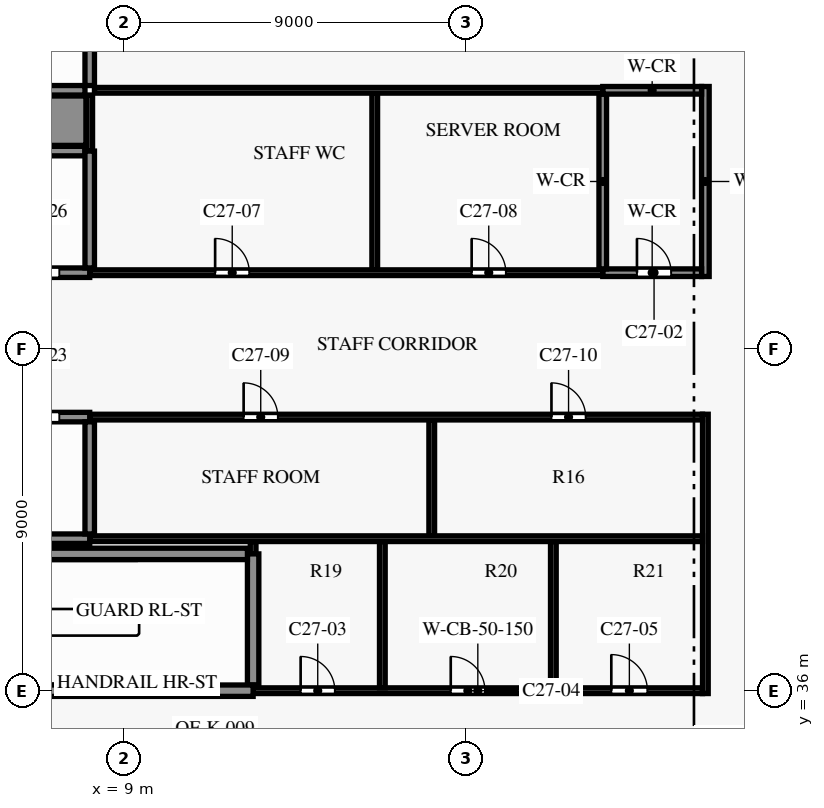
"""IFC4 building model, lengths in metres.
Left out: names, types, materials, properties, quantities, classifications, styles, units other than length and angle.
Written with IfcOpenShell. Run it as: python <this file> out.ifc"""

import sys

from ifc_helpers import new_model, si_unit, direction, frame, frame_2d, origin, place, context, subcontext, project, spatial, rectangle, extrude, element, fill, save


model = new_model("IFC4")
c1 = context("Model", 3, precision=1e-05, world=origin(), true_north=direction((0.0, 1.0)))
c2 = subcontext(c1, "Body", "Model", "MODEL_VIEW")
j1 = project(units=[si_unit("LENGTHUNIT", "METRE"), si_unit("PLANEANGLEUNIT", "RADIAN")], contexts=[c1])
p1 = place(None, origin())
s1 = spatial("IfcSite", under=j1, at=p1, CompositionType="ELEMENT")
p2 = place(p1, origin())
s2 = spatial("IfcBuilding", under=s1, at=p2, CompositionType="ELEMENT")
p3 = place(p2, frame((0.0, 0.0, 198.8)))
s3 = spatial("IfcBuildingStorey", under=s2, at=p3, CompositionType="ELEMENT", Elevation=198.8)
p4 = place(p3, frame((12.4, 36.0, 0.0), z_axis=(0.0, 0.0, 1.0), x_axis=(1.0, 0.0, 0.0)))
e1 = element("IfcWall", 1, at=p4, inside=s3, PredefinedType="SHEAR", context=c2, shape_type="SweptSolid", body=[
    extrude(rectangle(XDim=11.825, YDim=0.15, at=frame_2d((5.913, 0.0))), origin(), (0.0, 0.0, 1.0), 3.5),
])
p5 = place(p4, frame((1.25, 0.0, 0.0)))
e2 = element("IfcOpeningElement", 2, at=p5, cuts=e1, PredefinedType="OPENING", context=c2, shape_type="SweptSolid", body=[
    extrude(rectangle(XDim=0.9, YDim=2.1, at=frame_2d((0.45, 1.05))), frame((0.0, 0.085, 0.0), z_axis=(0.0, -1.0, 0.0), x_axis=(1.0, 0.0, 0.0)), (0.0, 0.0, 1.0), 0.17),
])
p6 = place(p4, frame((5.2, 0.0, 0.0)))
e3 = element("IfcOpeningElement", 3, at=p6, cuts=e1, PredefinedType="OPENING", context=c2, shape_type="SweptSolid", body=[
    extrude(rectangle(XDim=0.9, YDim=2.1, at=frame_2d((0.45, 1.05))), frame((0.0, 0.085, 0.0), z_axis=(0.0, -1.0, 0.0), x_axis=(1.0, 0.0, 0.0)), (0.0, 0.0, 1.0), 0.17),
])
p7 = place(p4, frame((9.425, 0.0, 0.0)))
e4 = element("IfcOpeningElement", 4, at=p7, cuts=e1, PredefinedType="OPENING", context=c2, shape_type="SweptSolid", body=[
    extrude(rectangle(XDim=0.95, YDim=2.1, at=frame_2d((0.475, 1.05))), frame((0.0, 0.085, 0.0), z_axis=(0.0, -1.0, 0.0), x_axis=(1.0, 0.0, 0.0)), (0.0, 0.0, 1.0), 0.17),
])
p8 = place(p3, frame((4.4, 36.0, 0.0), z_axis=(0.0, 0.0, 1.0), x_axis=(1.0, 0.0, 0.0)))
e5 = element("IfcWall", 5, at=p8, inside=s3, PredefinedType="SHEAR", context=c2, shape_type="SweptSolid", body=[
    extrude(rectangle(XDim=8.0, YDim=0.3, at=frame_2d((4.0, 0.0))), origin(), (0.0, 0.0, 1.0), 3.5),
])
p9 = place(p8, frame((0.3, 0.0, 0.0)))
e6 = element("IfcOpeningElement", 6, at=p9, cuts=e5, PredefinedType="OPENING", context=c2, shape_type="SweptSolid", body=[
    extrude(rectangle(XDim=1.5, YDim=2.2, at=frame_2d((0.75, 1.1))), frame((0.0, 0.16, 0.0), z_axis=(0.0, -1.0, 0.0), x_axis=(1.0, 0.0, 0.0)), (0.0, 0.0, 1.0), 0.32),
])
p10 = place(p3, frame((4.55, 39.6, 0.0), z_axis=(0.0, 0.0, 1.0), x_axis=(1.0, 0.0, 0.0)))
e7 = element("IfcWall", 7, at=p10, inside=s3, PredefinedType="SHEAR", context=c2, shape_type="SweptSolid", body=[
    extrude(rectangle(XDim=7.7, YDim=0.3, at=frame_2d((3.85, 0.0))), origin(), (0.0, 0.0, 1.0), 3.5),
])
p11 = place(p3, frame((8.1, 40.0, 0.0), z_axis=(0.0, 0.0, 1.0), x_axis=(1.0, 0.0, 0.0)))
e8 = element("IfcWall", 8, at=p11, inside=s3, PredefinedType="PARTITIONING", context=c2, shape_type="SweptSolid", body=[
    extrude(rectangle(XDim=16.125, YDim=0.15, at=frame_2d((8.062, 0.0))), origin(), (0.0, 0.0, 1.0), 3.5),
])
p12 = place(p3, frame((0.15, 40.0, 0.0), z_axis=(0.0, 0.0, 1.0), x_axis=(1.0, 0.0, 0.0)))
e9 = element("IfcWall", 9, at=p12, inside=s3, PredefinedType="SHEAR", context=c2, shape_type="SweptSolid", body=[
    extrude(rectangle(XDim=7.95, YDim=0.25, at=frame_2d((3.975, 0.0))), origin(), (0.0, 0.0, 1.0), 3.5),
])
p13 = place(p3, frame((8.1, 43.2, 0.0), z_axis=(0.0, 0.0, 1.0), x_axis=(1.0, 0.0, 0.0)))
e10 = element("IfcWall", 10, at=p13, inside=s3, PredefinedType="PARTITIONING", context=c2, shape_type="SweptSolid", body=[
    extrude(rectangle(XDim=16.125, YDim=0.15, at=frame_2d((8.062, 0.0))), origin(), (0.0, 0.0, 1.0), 3.5),
])
p14 = place(p13, frame((4.05, 0.0, 0.0)))
e11 = element("IfcOpeningElement", 11, at=p14, cuts=e10, PredefinedType="OPENING", context=c2, shape_type="SweptSolid", body=[
    extrude(rectangle(XDim=0.9, YDim=2.1, at=frame_2d((0.45, 1.05))), frame((0.0, 0.085, 0.0), z_axis=(0.0, -1.0, 0.0), x_axis=(1.0, 0.0, 0.0)), (0.0, 0.0, 1.0), 0.17),
])
p15 = place(p13, frame((12.15, 0.0, 0.0)))
e12 = element("IfcOpeningElement", 12, at=p15, cuts=e10, PredefinedType="OPENING", context=c2, shape_type="SweptSolid", body=[
    extrude(rectangle(XDim=0.9, YDim=2.1, at=frame_2d((0.45, 1.05))), frame((0.0, 0.085, 0.0), z_axis=(0.0, -1.0, 0.0), x_axis=(1.0, 0.0, 0.0)), (0.0, 0.0, 1.0), 0.17),
])
p16 = place(p3, frame((0.125, 43.2, 0.0), z_axis=(0.0, 0.0, 1.0), x_axis=(1.0, 0.0, 0.0)))
e13 = element("IfcWall", 13, at=p16, inside=s3, PredefinedType="SHEAR", context=c2, shape_type="SweptSolid", body=[
    extrude(rectangle(XDim=7.975, YDim=0.25, at=frame_2d((3.988, 0.0))), origin(), (0.0, 0.0, 1.0), 3.5),
])
p17 = place(p16, frame((0.675, 0.0, 0.0)))
e14 = element("IfcOpeningElement", 14, at=p17, cuts=e13, PredefinedType="OPENING", context=c2, shape_type="SweptSolid", body=[
    extrude(rectangle(XDim=1.1, YDim=2.1, at=frame_2d((0.55, 1.05))), frame((0.0, 0.135, 0.0), z_axis=(0.0, -1.0, 0.0), x_axis=(1.0, 0.0, 0.0)), (0.0, 0.0, 1.0), 0.27),
])
p18 = place(p16, frame((3.375, 0.0, 0.0)))
e15 = element("IfcOpeningElement", 15, at=p18, cuts=e13, PredefinedType="OPENING", context=c2, shape_type="SweptSolid", body=[
    extrude(rectangle(XDim=1.1, YDim=2.1, at=frame_2d((0.55, 1.05))), frame((0.0, 0.135, 0.0), z_axis=(0.0, -1.0, 0.0), x_axis=(1.0, 0.0, 0.0)), (0.0, 0.0, 1.0), 0.27),
])
p19 = place(p16, frame((6.075, 0.0, 0.0)))
e16 = element("IfcOpeningElement", 16, at=p19, cuts=e13, PredefinedType="OPENING", context=c2, shape_type="SweptSolid", body=[
    extrude(rectangle(XDim=1.1, YDim=2.1, at=frame_2d((0.55, 1.05))), frame((0.0, 0.135, 0.0), z_axis=(0.0, -1.0, 0.0), x_axis=(1.0, 0.0, 0.0)), (0.0, 0.0, 1.0), 0.27),
])
p20 = place(p3, frame((8.1, 47.0, 0.0), z_axis=(0.0, 0.0, 1.0), x_axis=(1.0, 0.0, 0.0)))
e17 = element("IfcWall", 17, at=p20, inside=s3, PredefinedType="PARTITIONING", context=c2, shape_type="SweptSolid", body=[
    extrude(rectangle(XDim=13.5, YDim=0.15, at=frame_2d((6.75, 0.0))), origin(), (0.0, 0.0, 1.0), 3.5),
])
p21 = place(p20, frame((3.3, 0.0, 0.0)))
e18 = element("IfcOpeningElement", 18, at=p21, cuts=e17, PredefinedType="OPENING", context=c2, shape_type="SweptSolid", body=[
    extrude(rectangle(XDim=0.9, YDim=2.1, at=frame_2d((0.45, 1.05))), frame((0.0, 0.085, 0.0), z_axis=(0.0, -1.0, 0.0), x_axis=(1.0, 0.0, 0.0)), (0.0, 0.0, 1.0), 0.17),
])
p22 = place(p20, frame((10.05, 0.0, 0.0)))
e19 = element("IfcOpeningElement", 19, at=p22, cuts=e17, PredefinedType="OPENING", context=c2, shape_type="SweptSolid", body=[
    extrude(rectangle(XDim=0.9, YDim=2.1, at=frame_2d((0.45, 1.05))), frame((0.0, 0.085, 0.0), z_axis=(0.0, -1.0, 0.0), x_axis=(1.0, 0.0, 0.0)), (0.0, 0.0, 1.0), 0.17),
])
p23 = place(p3, frame((21.6, 47.0, 0.0), z_axis=(0.0, 0.0, 1.0), x_axis=(1.0, 0.0, 0.0)))
e20 = element("IfcWall", 20, at=p23, inside=s3, PredefinedType="PARTITIONING", context=c2, shape_type="SweptSolid", body=[
    extrude(rectangle(XDim=2.6, YDim=0.2, at=frame_2d((1.3, 0.0))), origin(), (0.0, 0.0, 1.0), 3.5),
])
p24 = place(p23, frame((0.9, 0.0, 0.0)))
e21 = element("IfcOpeningElement", 21, at=p24, cuts=e20, PredefinedType="OPENING", context=c2, shape_type="SweptSolid", body=[
    extrude(rectangle(XDim=0.9, YDim=2.1, at=frame_2d((0.45, 1.05))), frame((0.0, 0.11, 0.0), z_axis=(0.0, -1.0, 0.0), x_axis=(1.0, 0.0, 0.0)), (0.0, 0.0, 1.0), 0.22),
])
p25 = place(p3, frame((0.125, 47.0, 0.0), z_axis=(0.0, 0.0, 1.0), x_axis=(1.0, 0.0, 0.0)))
e22 = element("IfcWall", 22, at=p25, inside=s3, PredefinedType="SHEAR", context=c2, shape_type="SweptSolid", body=[
    extrude(rectangle(XDim=7.975, YDim=0.25, at=frame_2d((3.988, 0.0))), origin(), (0.0, 0.0, 1.0), 3.5),
])
p26 = place(p25, frame((0.675, 0.0, 0.0)))
e23 = element("IfcOpeningElement", 23, at=p26, cuts=e22, PredefinedType="OPENING", context=c2, shape_type="SweptSolid", body=[
    extrude(rectangle(XDim=1.1, YDim=2.1, at=frame_2d((0.55, 1.05))), frame((0.0, 0.135, 0.0), z_axis=(0.0, -1.0, 0.0), x_axis=(1.0, 0.0, 0.0)), (0.0, 0.0, 1.0), 0.27),
])
p27 = place(p25, frame((3.375, 0.0, 0.0)))
e24 = element("IfcOpeningElement", 24, at=p27, cuts=e22, PredefinedType="OPENING", context=c2, shape_type="SweptSolid", body=[
    extrude(rectangle(XDim=1.1, YDim=2.1, at=frame_2d((0.55, 1.05))), frame((0.0, 0.135, 0.0), z_axis=(0.0, -1.0, 0.0), x_axis=(1.0, 0.0, 0.0)), (0.0, 0.0, 1.0), 0.27),
])
p28 = place(p25, frame((6.075, 0.0, 0.0)))
e25 = element("IfcOpeningElement", 25, at=p28, cuts=e22, PredefinedType="OPENING", context=c2, shape_type="SweptSolid", body=[
    extrude(rectangle(XDim=1.1, YDim=2.1, at=frame_2d((0.55, 1.05))), frame((0.0, 0.135, 0.0), z_axis=(0.0, -1.0, 0.0), x_axis=(1.0, 0.0, 0.0)), (0.0, 0.0, 1.0), 0.27),
])
p29 = place(p3, frame((0.125, 50.2, 0.0), z_axis=(0.0, 0.0, 1.0), x_axis=(1.0, 0.0, 0.0)))
e26 = element("IfcWall", 26, at=p29, inside=s3, PredefinedType="SHEAR", context=c2, shape_type="SweptSolid", body=[
    extrude(rectangle(XDim=7.85, YDim=0.25, at=frame_2d((3.925, 0.0))), origin(), (0.0, 0.0, 1.0), 3.5),
])
p30 = place(p3, frame((-0.125, 51.0, 0.0), z_axis=(0.0, 0.0, 1.0), x_axis=(1.0, 0.0, 0.0)))
e27 = element("IfcWall", 27, at=p30, inside=s3, PredefinedType="SHEAR", context=c2, shape_type="SweptSolid", body=[
    extrude(rectangle(XDim=8.125, YDim=1.3, at=frame_2d((4.062, 0.0))), origin(), (0.0, 0.0, 1.0), 3.5),
])
p31 = place(p3, frame((8.225, 51.8, 0.0), z_axis=(0.0, 0.0, 1.0), x_axis=(1.0, 0.0, 0.0)))
e28 = element("IfcWall", 28, at=p31, inside=s3, PredefinedType="PARTITIONING", context=c2, shape_type="SweptSolid", body=[
    extrude(rectangle(XDim=13.375, YDim=0.15, at=frame_2d((6.688, 0.0))), origin(), (0.0, 0.0, 1.0), 3.5),
])
p32 = place(p3, frame((21.6, 51.8, 0.0), z_axis=(0.0, 0.0, 1.0), x_axis=(1.0, 0.0, 0.0)))
e29 = element("IfcWall", 29, at=p32, inside=s3, PredefinedType="PARTITIONING", context=c2, shape_type="SweptSolid", body=[
    extrude(rectangle(XDim=2.6, YDim=0.2, at=frame_2d((1.3, 0.0))), origin(), (0.0, 0.0, 1.0), 3.5),
])
p33 = place(p3, frame((0.125, 51.8, 0.0), z_axis=(0.0, 0.0, 1.0), x_axis=(1.0, 0.0, 0.0)))
e30 = element("IfcWall", 30, at=p33, inside=s3, PredefinedType="SHEAR", context=c2, shape_type="SweptSolid", body=[
    extrude(rectangle(XDim=7.85, YDim=0.25, at=frame_2d((3.925, 0.0))), origin(), (0.0, 0.0, 1.0), 3.5),
])
p34 = place(p3, frame((8.1, 50.2, 0.0), z_axis=(0.0, 0.0, 1.0), x_axis=(0.0, 1.0, 0.0)))
e31 = element("IfcWall", 31, at=p34, inside=s3, PredefinedType="PARTITIONING", context=c2, shape_type="SweptSolid", body=[
    extrude(rectangle(XDim=1.475, YDim=0.15, at=frame_2d((0.738, 0.0))), origin(), (0.0, 0.0, 1.0), 3.5),
])
p35 = place(p3, frame((8.1, 40.125, 0.0), z_axis=(0.0, 0.0, 1.0), x_axis=(0.0, 1.0, 0.0)))
e32 = element("IfcWall", 32, at=p35, inside=s3, PredefinedType="SHEAR", context=c2, shape_type="SweptSolid", body=[
    extrude(rectangle(XDim=2.95, YDim=0.25, at=frame_2d((1.475, 0.0))), origin(), (0.0, 0.0, 1.0), 3.5),
])
p36 = place(p3, frame((8.1, 47.125, 0.0), z_axis=(0.0, 0.0, 1.0), x_axis=(0.0, 1.0, 0.0)))
e33 = element("IfcWall", 33, at=p36, inside=s3, PredefinedType="SHEAR", context=c2, shape_type="SweptSolid", body=[
    extrude(rectangle(XDim=3.075, YDim=0.25, at=frame_2d((1.538, 0.0))), origin(), (0.0, 0.0, 1.0), 3.5),
])
p37 = place(p3, frame((8.1, 51.925, 0.0), z_axis=(0.0, 0.0, 1.0), x_axis=(0.0, 1.0, 0.0)))
e34 = element("IfcWall", 34, at=p37, inside=s3, PredefinedType="SHEAR", context=c2, shape_type="SweptSolid", body=[
    extrude(rectangle(XDim=2.95, YDim=0.25, at=frame_2d((1.475, 0.0))), origin(), (0.0, 0.0, 1.0), 3.5),
])
p38 = place(p3, frame((12.4, 39.6, 0.0), z_axis=(0.0, 0.0, 1.0), x_axis=(0.0, 1.0, 0.0)))
e35 = element("IfcWall", 35, at=p38, inside=s3, PredefinedType="PARTITIONING", context=c2, shape_type="SweptSolid", body=[
    extrude(rectangle(XDim=0.325, YDim=0.15, at=frame_2d((0.163, 0.0))), origin(), (0.0, 0.0, 1.0), 3.5),
])
p39 = place(p3, frame((12.4, 36.15, 0.0), z_axis=(0.0, 0.0, 1.0), x_axis=(0.0, 1.0, 0.0)))
e36 = element("IfcWall", 36, at=p39, inside=s3, PredefinedType="SHEAR", context=c2, shape_type="SweptSolid", body=[
    extrude(rectangle(XDim=3.45, YDim=0.3, at=frame_2d((1.725, 0.0))), origin(), (0.0, 0.0, 1.0), 3.5),
])
p40 = place(p3, frame((15.6, 47.075, 0.0), z_axis=(0.0, 0.0, 1.0), x_axis=(0.0, 1.0, 0.0)))
e37 = element("IfcWall", 37, at=p40, inside=s3, PredefinedType="PARTITIONING", context=c2, shape_type="SweptSolid", body=[
    extrude(rectangle(XDim=4.65, YDim=0.15, at=frame_2d((2.325, 0.0))), origin(), (0.0, 0.0, 1.0), 3.5),
])
p41 = place(p3, frame((15.8, 36.075, 0.0), z_axis=(0.0, 0.0, 1.0), x_axis=(0.0, 1.0, 0.0)))
e38 = element("IfcWall", 38, at=p41, inside=s3, PredefinedType="PARTITIONING", context=c2, shape_type="SweptSolid", body=[
    extrude(rectangle(XDim=3.85, YDim=0.15, at=frame_2d((1.925, 0.0))), origin(), (0.0, 0.0, 1.0), 3.5),
])
p42 = place(p3, frame((17.1, 40.075, 0.0), z_axis=(0.0, 0.0, 1.0), x_axis=(0.0, 1.0, 0.0)))
e39 = element("IfcWall", 39, at=p42, inside=s3, PredefinedType="PARTITIONING", context=c2, shape_type="SweptSolid", body=[
    extrude(rectangle(XDim=3.05, YDim=0.15, at=frame_2d((1.525, 0.0))), origin(), (0.0, 0.0, 1.0), 3.5),
])
p43 = place(p3, frame((20.3, 36.075, 0.0), z_axis=(0.0, 0.0, 1.0), x_axis=(0.0, 1.0, 0.0)))
e40 = element("IfcWall", 40, at=p43, inside=s3, PredefinedType="PARTITIONING", context=c2, shape_type="SweptSolid", body=[
    extrude(rectangle(XDim=3.85, YDim=0.15, at=frame_2d((1.925, 0.0))), origin(), (0.0, 0.0, 1.0), 3.5),
])
p44 = place(p3, frame((21.6, 47.1, 0.0), z_axis=(0.0, 0.0, 1.0), x_axis=(0.0, 1.0, 0.0)))
e41 = element("IfcWall", 41, at=p44, inside=s3, PredefinedType="PARTITIONING", context=c2, shape_type="SweptSolid", body=[
    extrude(rectangle(XDim=4.6, YDim=0.2, at=frame_2d((2.3, 0.0))), origin(), (0.0, 0.0, 1.0), 3.5),
])
p45 = place(p3, frame((24.3, 35.925, 0.0), z_axis=(0.0, 0.0, 1.0), x_axis=(0.0, 1.0, 0.0)))
e42 = element("IfcWall", 42, at=p45, inside=s3, PredefinedType="PARTITIONING", context=c2, shape_type="SweptSolid", body=[
    extrude(rectangle(XDim=7.35, YDim=0.15, at=frame_2d((3.675, 0.0))), origin(), (0.0, 0.0, 1.0), 3.5),
])
p46 = place(p3, frame((24.3, 46.9, 0.0), z_axis=(0.0, 0.0, 1.0), x_axis=(0.0, 1.0, 0.0)))
e43 = element("IfcWall", 43, at=p46, inside=s3, PredefinedType="SHEAR", context=c2, shape_type="SweptSolid", body=[
    extrude(rectangle(XDim=5.0, YDim=0.2, at=frame_2d((2.5, 0.0))), origin(), (0.0, 0.0, 1.0), 3.5),
])
p47 = place(p24, origin())
e44 = element("IfcDoor", 44, at=p47, inside=s3, OperationType="SINGLE_SWING_LEFT", PredefinedType="DOOR", context=c2, shape_type="SweptSolid", body=[
    extrude(rectangle(XDim=0.9, YDim=2.1, at=frame_2d((0.45, 1.05))), frame((0.0, 0.025, 0.0), z_axis=(0.0, -1.0, 0.0), x_axis=(1.0, 0.0, 0.0)), (0.0, 0.0, 1.0), 0.05),
])
fill(e21, e44)
p48 = place(p5, origin())
e45 = element("IfcDoor", 45, at=p48, inside=s3, OperationType="SINGLE_SWING_RIGHT", PredefinedType="DOOR", context=c2, shape_type="SweptSolid", body=[
    extrude(rectangle(XDim=0.9, YDim=2.1, at=frame_2d((0.45, 1.05))), frame((0.0, 0.025, 0.0), z_axis=(0.0, -1.0, 0.0), x_axis=(1.0, 0.0, 0.0)), (0.0, 0.0, 1.0), 0.05),
])
fill(e2, e45)
p49 = place(p6, origin())
e46 = element("IfcDoor", 46, at=p49, inside=s3, OperationType="SINGLE_SWING_LEFT", PredefinedType="DOOR", context=c2, shape_type="SweptSolid", body=[
    extrude(rectangle(XDim=0.9, YDim=2.1, at=frame_2d((0.45, 1.05))), frame((0.0, 0.025, 0.0), z_axis=(0.0, -1.0, 0.0), x_axis=(1.0, 0.0, 0.0)), (0.0, 0.0, 1.0), 0.05),
])
fill(e3, e46)
p50 = place(p7, origin())
e47 = element("IfcDoor", 47, at=p50, inside=s3, OperationType="SINGLE_SWING_RIGHT", PredefinedType="DOOR", context=c2, shape_type="SweptSolid", body=[
    extrude(rectangle(XDim=0.95, YDim=2.1, at=frame_2d((0.475, 1.05))), frame((0.0, 0.025, 0.0), z_axis=(0.0, -1.0, 0.0), x_axis=(1.0, 0.0, 0.0)), (0.0, 0.0, 1.0), 0.05),
])
fill(e4, e47)
p51 = place(p21, origin())
e48 = element("IfcDoor", 48, at=p51, inside=s3, OperationType="SINGLE_SWING_LEFT", PredefinedType="DOOR", context=c2, shape_type="SweptSolid", body=[
    extrude(rectangle(XDim=0.9, YDim=2.1, at=frame_2d((0.45, 1.05))), frame((0.0, 0.025, 0.0), z_axis=(0.0, -1.0, 0.0), x_axis=(1.0, 0.0, 0.0)), (0.0, 0.0, 1.0), 0.05),
])
fill(e18, e48)
p52 = place(p22, origin())
e49 = element("IfcDoor", 49, at=p52, inside=s3, OperationType="SINGLE_SWING_RIGHT", PredefinedType="DOOR", context=c2, shape_type="SweptSolid", body=[
    extrude(rectangle(XDim=0.9, YDim=2.1, at=frame_2d((0.45, 1.05))), frame((0.0, 0.025, 0.0), z_axis=(0.0, -1.0, 0.0), x_axis=(1.0, 0.0, 0.0)), (0.0, 0.0, 1.0), 0.05),
])
fill(e19, e49)
p53 = place(p14, origin())
e50 = element("IfcDoor", 50, at=p53, inside=s3, OperationType="SINGLE_SWING_RIGHT", PredefinedType="DOOR", context=c2, shape_type="SweptSolid", body=[
    extrude(rectangle(XDim=0.9, YDim=2.1, at=frame_2d((0.45, 1.05))), frame((0.0, 0.025, 0.0), z_axis=(0.0, -1.0, 0.0), x_axis=(1.0, 0.0, 0.0)), (0.0, 0.0, 1.0), 0.05),
])
fill(e11, e50)
p54 = place(p15, origin())
e51 = element("IfcDoor", 51, at=p54, inside=s3, OperationType="SINGLE_SWING_LEFT", PredefinedType="DOOR", context=c2, shape_type="SweptSolid", body=[
    extrude(rectangle(XDim=0.9, YDim=2.1, at=frame_2d((0.45, 1.05))), frame((0.0, 0.025, 0.0), z_axis=(0.0, -1.0, 0.0), x_axis=(1.0, 0.0, 0.0)), (0.0, 0.0, 1.0), 0.05),
])
fill(e12, e51)
p55 = place(p19, origin())
e52 = element("IfcDoor", 52, at=p55, inside=s3, OperationType="DOUBLE_DOOR_SLIDING", PredefinedType="DOOR", context=c2, shape_type="SweptSolid", body=[
    extrude(rectangle(XDim=1.1, YDim=2.1, at=frame_2d((0.55, 1.05))), frame((0.0, 0.025, 0.0), z_axis=(0.0, -1.0, 0.0), x_axis=(1.0, 0.0, 0.0)), (0.0, 0.0, 1.0), 0.05),
])
fill(e16, e52)
p56 = place(p28, origin())
e53 = element("IfcDoor", 53, at=p56, inside=s3, OperationType="DOUBLE_DOOR_SLIDING", PredefinedType="DOOR", context=c2, shape_type="SweptSolid", body=[
    extrude(rectangle(XDim=1.1, YDim=2.1, at=frame_2d((0.55, 1.05))), frame((0.0, 0.025, 0.0), z_axis=(0.0, -1.0, 0.0), x_axis=(1.0, 0.0, 0.0)), (0.0, 0.0, 1.0), 0.05),
])
fill(e25, e53)
save(model, sys.argv[1])
